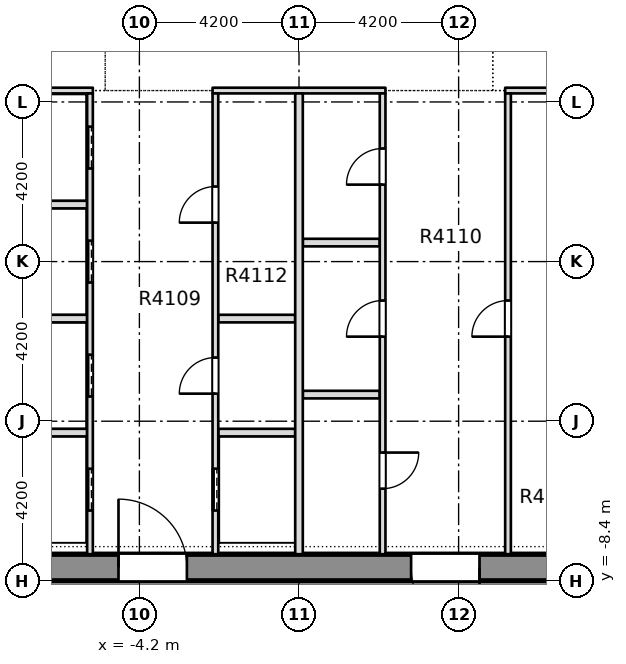
"""IFC4 building model, lengths in metres.
Left out: names, types, materials, properties, quantities, classifications, styles, units other than length and angle.
Written with IfcOpenShell. Run it as: python <this file> out.ifc"""

import sys

from ifc_helpers import new_model, si_unit, direction, frame, frame_2d, origin, place, context, subcontext, project, spatial, rectangle, extrude, element, fill, save


model = new_model("IFC4")
c1 = context("Model", 3, precision=1e-05, world=origin(), true_north=direction((0.0, 1.0)))
c2 = subcontext(c1, "Body", "Model", "MODEL_VIEW")
j1 = project(units=[si_unit("LENGTHUNIT", "METRE"), si_unit("PLANEANGLEUNIT", "RADIAN")], contexts=[c1])
p1 = place(None, origin())
s1 = spatial("IfcSite", under=j1, at=p1, CompositionType="ELEMENT")
p2 = place(p1, origin())
s2 = spatial("IfcBuilding", under=s1, at=p2, CompositionType="ELEMENT")
p3 = place(p2, frame((0.0, 0.0, 160.7)))
s3 = spatial("IfcBuildingStorey", under=s2, at=p3, CompositionType="ELEMENT", Elevation=160.7)
p4 = place(p3, frame((-7.7, -8.05, -0.4), z_axis=(0.0, 0.0, 1.0), x_axis=(1.0, 0.0, 0.0)))
e1 = element("IfcWall", 1, at=p4, inside=s3, PredefinedType="SHEAR", context=c2, shape_type="SweptSolid", body=[
    extrude(rectangle(XDim=15.4, YDim=0.7, at=frame_2d((7.7, 0.0))), origin(), (0.0, 0.0, 1.0), 3.45),
])
p5 = place(p4, frame((2.95, 0.0, 0.4)))
e2 = element("IfcOpeningElement", 2, at=p5, cuts=e1, PredefinedType="OPENING", context=c2, shape_type="SweptSolid", body=[
    extrude(rectangle(XDim=1.8, YDim=2.1, at=frame_2d((0.9, 1.05))), frame((0.0, 0.36, 0.0), z_axis=(0.0, -1.0, 0.0), x_axis=(1.0, 0.0, 0.0)), (0.0, 0.0, 1.0), 0.72),
])
p6 = place(p4, frame((10.65, 0.0, 0.4)))
e3 = element("IfcOpeningElement", 3, at=p6, cuts=e1, PredefinedType="OPENING", context=c2, shape_type="SweptSolid", body=[
    extrude(rectangle(XDim=1.8, YDim=2.1, at=frame_2d((0.9, 1.05))), frame((0.0, 0.36, 0.0), z_axis=(0.0, -1.0, 0.0), x_axis=(1.0, 0.0, 0.0)), (0.0, 0.0, 1.0), 0.72),
])
p7 = place(p3, frame((-7.699, -4.5, 0.0), z_axis=(0.0, 0.0, 1.0), x_axis=(1.0, 0.0, 0.0)))
e4 = element("IfcWall", 4, at=p7, inside=s3, PredefinedType="PARTITIONING", context=c2, shape_type="SweptSolid", body=[
    extrude(rectangle(XDim=2.124, YDim=0.2, at=frame_2d((1.062, 0.0))), origin(), (0.0, 0.0, 1.0), 3.05),
])
for number, where, z_axis, x_axis in (
    (5, (-2.125, -4.5, 0.0), (0.0, 0.0, 1.0), (1.0, 0.0, 0.0)),
    (6, (0.1, -3.5, 0.0), (0.0, 0.0, 1.0), (1.0, 0.0, 0.0)),
):
    element("IfcWall", number, at=place(p3, frame(where, z_axis=z_axis, x_axis=x_axis)), inside=s3, PredefinedType="PARTITIONING", context=c2, shape_type="SweptSolid", body=[
        extrude(rectangle(XDim=2.025, YDim=0.2, at=frame_2d((1.012, 0.0))), origin(), (0.0, 0.0, 1.0), 3.05),
    ])
p8 = place(p3, frame((-7.699, -1.5, 0.0), z_axis=(0.0, 0.0, 1.0), x_axis=(1.0, 0.0, 0.0)))
e7 = element("IfcWall", 7, at=p8, inside=s3, PredefinedType="PARTITIONING", context=c2, shape_type="SweptSolid", body=[
    extrude(rectangle(XDim=2.124, YDim=0.2, at=frame_2d((1.062, 0.0))), origin(), (0.0, 0.0, 1.0), 3.05),
])
for number, where, z_axis, x_axis in (
    (8, (-2.125, -1.5, 0.0), (0.0, 0.0, 1.0), (1.0, 0.0, 0.0)),
    (9, (0.1, 0.5, 0.0), (0.0, 0.0, 1.0), (1.0, 0.0, 0.0)),
):
    element("IfcWall", number, at=place(p3, frame(where, z_axis=z_axis, x_axis=x_axis)), inside=s3, PredefinedType="PARTITIONING", context=c2, shape_type="SweptSolid", body=[
        extrude(rectangle(XDim=2.025, YDim=0.2, at=frame_2d((1.012, 0.0))), origin(), (0.0, 0.0, 1.0), 3.05),
    ])
p9 = place(p3, frame((-7.699, 1.5, 0.0), z_axis=(0.0, 0.0, 1.0), x_axis=(1.0, 0.0, 0.0)))
e10 = element("IfcWall", 10, at=p9, inside=s3, PredefinedType="PARTITIONING", context=c2, shape_type="SweptSolid", body=[
    extrude(rectangle(XDim=2.124, YDim=0.2, at=frame_2d((1.062, 0.0))), origin(), (0.0, 0.0, 1.0), 3.05),
])
p10 = place(p3, frame((-7.699, 4.5, 0.0), z_axis=(0.0, 0.0, 1.0), x_axis=(1.0, 0.0, 0.0)))
e11 = element("IfcWall", 11, at=p10, inside=s3, PredefinedType="PARTITIONING", context=c2, shape_type="SweptSolid", body=[
    extrude(rectangle(XDim=2.274, YDim=0.15, at=frame_2d((1.137, 0.0))), origin(), (0.0, 0.0, 1.0), 3.05),
])
p11 = place(p3, frame((-2.275, 4.5, 0.0), z_axis=(0.0, 0.0, 1.0), x_axis=(1.0, 0.0, 0.0)))
e12 = element("IfcWall", 12, at=p11, inside=s3, PredefinedType="PARTITIONING", context=c2, shape_type="SweptSolid", body=[
    extrude(rectangle(XDim=4.55, YDim=0.15, at=frame_2d((2.275, 0.0))), origin(), (0.0, 0.0, 1.0), 3.05),
])
p12 = place(p3, frame((5.425, 4.5, 0.0), z_axis=(0.0, 0.0, 1.0), x_axis=(1.0, 0.0, 0.0)))
e13 = element("IfcWall", 13, at=p12, inside=s3, PredefinedType="PARTITIONING", context=c2, shape_type="SweptSolid", body=[
    extrude(rectangle(XDim=2.274, YDim=0.15, at=frame_2d((1.137, 0.0))), origin(), (0.0, 0.0, 1.0), 3.05),
])
p13 = place(p3, frame((-5.5, -7.699, 0.0), z_axis=(0.0, 0.0, 1.0), x_axis=(0.0, 1.0, 0.0)))
e14 = element("IfcWall", 14, at=p13, inside=s3, PredefinedType="PARTITIONING", context=c2, shape_type="SweptSolid", body=[
    extrude(rectangle(XDim=12.124, YDim=0.15, at=frame_2d((6.062, 0.0))), origin(), (0.0, 0.0, 1.0), 3.05),
])
p14 = place(p13, frame((1.149, 0.0, 0.0)))
e15 = element("IfcOpeningElement", 15, at=p14, cuts=e14, PredefinedType="OPENING", context=c2, shape_type="SweptSolid", body=[
    extrude(rectangle(XDim=1.1, YDim=2.1, at=frame_2d((0.55, 1.05))), frame((0.0, 0.085, 0.0), z_axis=(0.0, -1.0, 0.0), x_axis=(1.0, 0.0, 0.0)), (0.0, 0.0, 1.0), 0.17),
])
p15 = place(p13, frame((4.149, 0.0, 0.0)))
e16 = element("IfcOpeningElement", 16, at=p15, cuts=e14, PredefinedType="OPENING", context=c2, shape_type="SweptSolid", body=[
    extrude(rectangle(XDim=1.1, YDim=2.1, at=frame_2d((0.55, 1.05))), frame((0.0, 0.085, 0.0), z_axis=(0.0, -1.0, 0.0), x_axis=(1.0, 0.0, 0.0)), (0.0, 0.0, 1.0), 0.17),
])
p16 = place(p13, frame((7.149, 0.0, 0.0)))
e17 = element("IfcOpeningElement", 17, at=p16, cuts=e14, PredefinedType="OPENING", context=c2, shape_type="SweptSolid", body=[
    extrude(rectangle(XDim=1.1, YDim=2.1, at=frame_2d((0.55, 1.05))), frame((0.0, 0.085, 0.0), z_axis=(0.0, -1.0, 0.0), x_axis=(1.0, 0.0, 0.0)), (0.0, 0.0, 1.0), 0.17),
])
p17 = place(p13, frame((10.149, 0.0, 0.0)))
e18 = element("IfcOpeningElement", 18, at=p17, cuts=e14, PredefinedType="OPENING", context=c2, shape_type="SweptSolid", body=[
    extrude(rectangle(XDim=1.1, YDim=2.1, at=frame_2d((0.55, 1.05))), frame((0.0, 0.085, 0.0), z_axis=(0.0, -1.0, 0.0), x_axis=(1.0, 0.0, 0.0)), (0.0, 0.0, 1.0), 0.17),
])
p18 = place(p3, frame((-2.2, -7.699, 0.0), z_axis=(0.0, 0.0, 1.0), x_axis=(0.0, 1.0, 0.0)))
e19 = element("IfcWall", 19, at=p18, inside=s3, PredefinedType="PARTITIONING", context=c2, shape_type="SweptSolid", body=[
    extrude(rectangle(XDim=12.124, YDim=0.15, at=frame_2d((6.062, 0.0))), origin(), (0.0, 0.0, 1.0), 3.05),
])
p19 = place(p18, frame((1.149, 0.0, 0.0)))
e20 = element("IfcOpeningElement", 20, at=p19, cuts=e19, PredefinedType="OPENING", context=c2, shape_type="SweptSolid", body=[
    extrude(rectangle(XDim=1.1, YDim=2.1, at=frame_2d((0.55, 1.05))), frame((0.0, 0.085, 0.0), z_axis=(0.0, -1.0, 0.0), x_axis=(1.0, 0.0, 0.0)), (0.0, 0.0, 1.0), 0.17),
])
p20 = place(p18, frame((4.224, 0.0, 0.0)))
e21 = element("IfcOpeningElement", 21, at=p20, cuts=e19, PredefinedType="OPENING", context=c2, shape_type="SweptSolid", body=[
    extrude(rectangle(XDim=0.95, YDim=2.1, at=frame_2d((0.475, 1.05))), frame((0.0, 0.085, 0.0), z_axis=(0.0, -1.0, 0.0), x_axis=(1.0, 0.0, 0.0)), (0.0, 0.0, 1.0), 0.17),
])
p21 = place(p18, frame((8.724, 0.0, 0.0)))
e22 = element("IfcOpeningElement", 22, at=p21, cuts=e19, PredefinedType="OPENING", context=c2, shape_type="SweptSolid", body=[
    extrude(rectangle(XDim=0.95, YDim=2.1, at=frame_2d((0.475, 1.05))), frame((0.0, 0.085, 0.0), z_axis=(0.0, -1.0, 0.0), x_axis=(1.0, 0.0, 0.0)), (0.0, 0.0, 1.0), 0.17),
])
p22 = place(p3, frame((0.0, -7.699, 0.0), z_axis=(0.0, 0.0, 1.0), x_axis=(0.0, 1.0, 0.0)))
e23 = element("IfcWall", 23, at=p22, inside=s3, PredefinedType="PARTITIONING", context=c2, shape_type="SweptSolid", body=[
    extrude(rectangle(XDim=12.124, YDim=0.2, at=frame_2d((6.062, 0.0))), origin(), (0.0, 0.0, 1.0), 3.05),
])
p23 = place(p3, frame((2.2, -7.699, 0.0), z_axis=(0.0, 0.0, 1.0), x_axis=(0.0, 1.0, 0.0)))
e24 = element("IfcWall", 24, at=p23, inside=s3, PredefinedType="PARTITIONING", context=c2, shape_type="SweptSolid", body=[
    extrude(rectangle(XDim=12.124, YDim=0.15, at=frame_2d((6.062, 0.0))), origin(), (0.0, 0.0, 1.0), 3.05),
])
p24 = place(p23, frame((1.724, 0.0, 0.0)))
e25 = element("IfcOpeningElement", 25, at=p24, cuts=e24, PredefinedType="OPENING", context=c2, shape_type="SweptSolid", body=[
    extrude(rectangle(XDim=0.95, YDim=2.1, at=frame_2d((0.475, 1.05))), frame((0.0, 0.085, 0.0), z_axis=(0.0, -1.0, 0.0), x_axis=(1.0, 0.0, 0.0)), (0.0, 0.0, 1.0), 0.17),
])
p25 = place(p23, frame((5.724, 0.0, 0.0)))
e26 = element("IfcOpeningElement", 26, at=p25, cuts=e24, PredefinedType="OPENING", context=c2, shape_type="SweptSolid", body=[
    extrude(rectangle(XDim=0.95, YDim=2.1, at=frame_2d((0.475, 1.05))), frame((0.0, 0.085, 0.0), z_axis=(0.0, -1.0, 0.0), x_axis=(1.0, 0.0, 0.0)), (0.0, 0.0, 1.0), 0.17),
])
p26 = place(p23, frame((9.724, 0.0, 0.0)))
e27 = element("IfcOpeningElement", 27, at=p26, cuts=e24, PredefinedType="OPENING", context=c2, shape_type="SweptSolid", body=[
    extrude(rectangle(XDim=0.95, YDim=2.1, at=frame_2d((0.475, 1.05))), frame((0.0, 0.085, 0.0), z_axis=(0.0, -1.0, 0.0), x_axis=(1.0, 0.0, 0.0)), (0.0, 0.0, 1.0), 0.17),
])
p27 = place(p3, frame((5.5, -7.699, 0.0), z_axis=(0.0, 0.0, 1.0), x_axis=(0.0, 1.0, 0.0)))
e28 = element("IfcWall", 28, at=p27, inside=s3, PredefinedType="PARTITIONING", context=c2, shape_type="SweptSolid", body=[
    extrude(rectangle(XDim=12.124, YDim=0.15, at=frame_2d((6.062, 0.0))), origin(), (0.0, 0.0, 1.0), 3.05),
])
p28 = place(p27, frame((5.724, 0.0, 0.0)))
e29 = element("IfcOpeningElement", 29, at=p28, cuts=e28, PredefinedType="OPENING", context=c2, shape_type="SweptSolid", body=[
    extrude(rectangle(XDim=0.95, YDim=2.1, at=frame_2d((0.475, 1.05))), frame((0.0, 0.085, 0.0), z_axis=(0.0, -1.0, 0.0), x_axis=(1.0, 0.0, 0.0)), (0.0, 0.0, 1.0), 0.17),
])
p29 = place(p14, origin())
e30 = element("IfcDoor", 30, at=p29, inside=s3, OperationType="SLIDING_TO_LEFT", PredefinedType="DOOR", context=c2, shape_type="SweptSolid", body=[
    extrude(rectangle(XDim=1.1, YDim=2.1, at=frame_2d((0.55, 1.05))), frame((0.0, 0.025, 0.0), z_axis=(0.0, -1.0, 0.0), x_axis=(1.0, 0.0, 0.0)), (0.0, 0.0, 1.0), 0.05),
])
fill(e15, e30)
p30 = place(p15, origin())
e31 = element("IfcDoor", 31, at=p30, inside=s3, OperationType="SLIDING_TO_LEFT", PredefinedType="DOOR", context=c2, shape_type="SweptSolid", body=[
    extrude(rectangle(XDim=1.1, YDim=2.1, at=frame_2d((0.55, 1.05))), frame((0.0, 0.025, 0.0), z_axis=(0.0, -1.0, 0.0), x_axis=(1.0, 0.0, 0.0)), (0.0, 0.0, 1.0), 0.05),
])
fill(e16, e31)
p31 = place(p16, origin())
e32 = element("IfcDoor", 32, at=p31, inside=s3, OperationType="SLIDING_TO_LEFT", PredefinedType="DOOR", context=c2, shape_type="SweptSolid", body=[
    extrude(rectangle(XDim=1.1, YDim=2.1, at=frame_2d((0.55, 1.05))), frame((0.0, 0.025, 0.0), z_axis=(0.0, -1.0, 0.0), x_axis=(1.0, 0.0, 0.0)), (0.0, 0.0, 1.0), 0.05),
])
fill(e17, e32)
p32 = place(p17, origin())
e33 = element("IfcDoor", 33, at=p32, inside=s3, OperationType="SLIDING_TO_LEFT", PredefinedType="DOOR", context=c2, shape_type="SweptSolid", body=[
    extrude(rectangle(XDim=1.1, YDim=2.1, at=frame_2d((0.55, 1.05))), frame((0.0, 0.025, 0.0), z_axis=(0.0, -1.0, 0.0), x_axis=(1.0, 0.0, 0.0)), (0.0, 0.0, 1.0), 0.05),
])
fill(e18, e33)
p33 = place(p19, origin())
e34 = element("IfcDoor", 34, at=p33, inside=s3, OperationType="SLIDING_TO_LEFT", PredefinedType="DOOR", context=c2, shape_type="SweptSolid", body=[
    extrude(rectangle(XDim=1.1, YDim=2.1, at=frame_2d((0.55, 1.05))), frame((0.0, 0.025, 0.0), z_axis=(0.0, -1.0, 0.0), x_axis=(1.0, 0.0, 0.0)), (0.0, 0.0, 1.0), 0.05),
])
fill(e20, e34)
p34 = place(p20, origin())
e35 = element("IfcDoor", 35, at=p34, inside=s3, OperationType="SINGLE_SWING_RIGHT", PredefinedType="DOOR", context=c2, shape_type="SweptSolid", body=[
    extrude(rectangle(XDim=0.95, YDim=2.1, at=frame_2d((0.475, 1.05))), frame((0.0, 0.025, 0.0), z_axis=(0.0, -1.0, 0.0), x_axis=(1.0, 0.0, 0.0)), (0.0, 0.0, 1.0), 0.05),
])
fill(e21, e35)
p35 = place(p21, origin())
e36 = element("IfcDoor", 36, at=p35, inside=s3, OperationType="SINGLE_SWING_LEFT", PredefinedType="DOOR", context=c2, shape_type="SweptSolid", body=[
    extrude(rectangle(XDim=0.95, YDim=2.1, at=frame_2d((0.475, 1.05))), frame((0.0, 0.025, 0.0), z_axis=(0.0, -1.0, 0.0), x_axis=(1.0, 0.0, 0.0)), (0.0, 0.0, 1.0), 0.05),
])
fill(e22, e36)
p36 = place(p24, origin())
e37 = element("IfcDoor", 37, at=p36, inside=s3, OperationType="SINGLE_SWING_RIGHT", PredefinedType="DOOR", context=c2, shape_type="SweptSolid", body=[
    extrude(rectangle(XDim=0.95, YDim=2.1, at=frame_2d((0.475, 1.05))), frame((0.0, 0.025, 0.0), z_axis=(0.0, -1.0, 0.0), x_axis=(1.0, 0.0, 0.0)), (0.0, 0.0, 1.0), 0.05),
])
fill(e25, e37)
p37 = place(p25, origin())
e38 = element("IfcDoor", 38, at=p37, inside=s3, OperationType="SINGLE_SWING_RIGHT", PredefinedType="DOOR", context=c2, shape_type="SweptSolid", body=[
    extrude(rectangle(XDim=0.95, YDim=2.1, at=frame_2d((0.475, 1.05))), frame((0.0, 0.025, 0.0), z_axis=(0.0, -1.0, 0.0), x_axis=(1.0, 0.0, 0.0)), (0.0, 0.0, 1.0), 0.05),
])
fill(e26, e38)
p38 = place(p26, origin())
e39 = element("IfcDoor", 39, at=p38, inside=s3, OperationType="SINGLE_SWING_LEFT", PredefinedType="DOOR", context=c2, shape_type="SweptSolid", body=[
    extrude(rectangle(XDim=0.95, YDim=2.1, at=frame_2d((0.475, 1.05))), frame((0.0, 0.025, 0.0), z_axis=(0.0, -1.0, 0.0), x_axis=(1.0, 0.0, 0.0)), (0.0, 0.0, 1.0), 0.05),
])
fill(e27, e39)
p39 = place(p28, origin())
e40 = element("IfcDoor", 40, at=p39, inside=s3, OperationType="SINGLE_SWING_LEFT", PredefinedType="DOOR", context=c2, shape_type="SweptSolid", body=[
    extrude(rectangle(XDim=0.95, YDim=2.1, at=frame_2d((0.475, 1.05))), frame((0.0, 0.025, 0.0), z_axis=(0.0, -1.0, 0.0), x_axis=(1.0, 0.0, 0.0)), (0.0, 0.0, 1.0), 0.05),
])
fill(e29, e40)
p40 = place(p5, origin())
e41 = element("IfcDoor", 41, at=p40, inside=s3, OperationType="SINGLE_SWING_LEFT", PredefinedType="DOOR", context=c2, shape_type="SweptSolid", body=[
    extrude(rectangle(XDim=1.8, YDim=2.1, at=frame_2d((0.9, 1.05))), frame((0.0, 0.025, 0.0), z_axis=(0.0, -1.0, 0.0), x_axis=(1.0, 0.0, 0.0)), (0.0, 0.0, 1.0), 0.05),
])
fill(e2, e41)
p41 = place(p6, origin())
e42 = element("IfcDoor", 42, at=p41, inside=s3, OperationType="SINGLE_SWING_LEFT", PredefinedType="DOOR", context=c2, shape_type="SweptSolid", body=[
    extrude(rectangle(XDim=1.8, YDim=2.1, at=frame_2d((0.9, 1.05))), frame((0.0, 0.025, 0.0), z_axis=(0.0, -1.0, 0.0), x_axis=(1.0, 0.0, 0.0)), (0.0, 0.0, 1.0), 0.05),
])
fill(e3, e42)
save(model, sys.argv[1])
